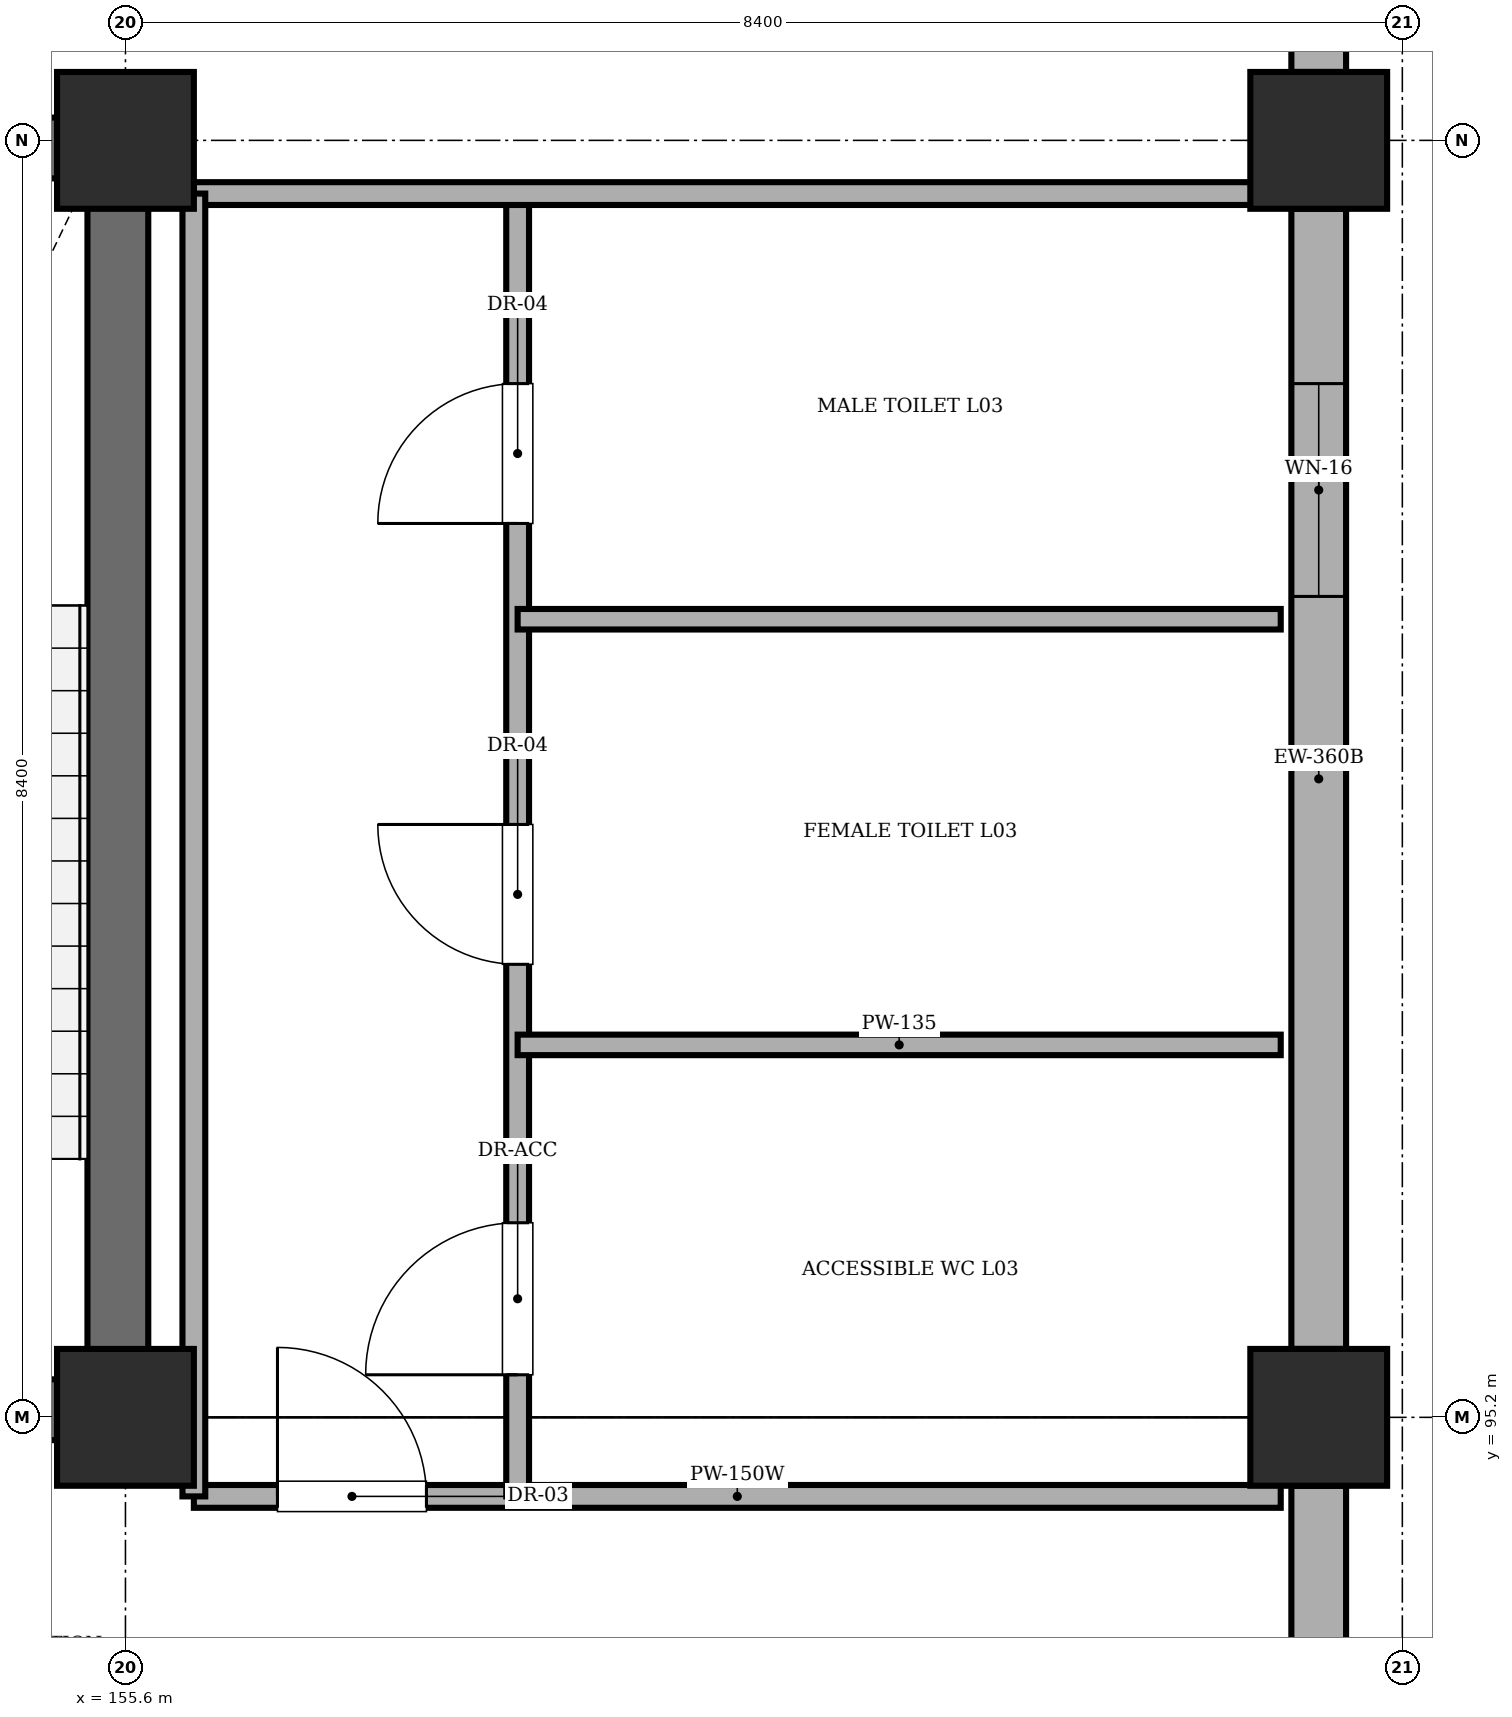
"""IFC4 building model, lengths in metres.
Left out: names, types, materials, properties, quantities, classifications, styles, units other than length and angle.
Written with IfcOpenShell. Run it as: python <this file> out.ifc"""

import sys

from ifc_helpers import new_model, si_unit, direction, frame, frame_2d, origin, origin_2d, place, context, subcontext, project, spatial, rectangle, extrude, element, fill, save


model = new_model("IFC4")
c1 = context("Model", 3, precision=1e-05, world=origin(), true_north=direction((0.0, 1.0)))
c2 = subcontext(c1, "Body", "Model", "MODEL_VIEW")
j1 = project(units=[si_unit("LENGTHUNIT", "METRE"), si_unit("PLANEANGLEUNIT", "RADIAN")], contexts=[c1])
p1 = place(None, origin())
s1 = spatial("IfcSite", under=j1, at=p1, CompositionType="ELEMENT")
p2 = place(p1, origin())
s2 = spatial("IfcBuilding", under=s1, at=p2, CompositionType="ELEMENT")
p3 = place(p2, frame((0.0, 0.0, 10.2)))
s3 = spatial("IfcBuildingStorey", under=s2, at=p3, CompositionType="ELEMENT", Elevation=10.2)
for number, where, z_axis, x_axis in (
    (1, (155.6, 95.2, 0.0), (0.0, 0.0, 1.0), (1.0, 0.0, 0.0)),
    (2, (155.6, 103.6, 0.0), (0.0, 0.0, 1.0), (1.0, 0.0, 0.0)),
    (3, (163.45, 95.2, 0.0), (0.0, 0.0, 1.0), (1.0, 0.0, 0.0)),
    (4, (163.45, 103.6, 0.0), (0.0, 0.0, 1.0), (1.0, 0.0, 0.0)),
):
    element("IfcColumn", number, at=place(p3, frame(where, z_axis=z_axis, x_axis=x_axis)), inside=s3, PredefinedType="COLUMN", context=c2, shape_type="SweptSolid", body=[
        extrude(rectangle(XDim=0.9, YDim=0.9, at=origin_2d()), origin(), (0.0, 0.0, 1.0), 4.26),
    ])
for number, where, z_axis, x_axis in (
    (5, (151.85, 95.25, 0.0), (0.0, 0.0, 1.0), (1.0, 0.0, 0.0)),
    (6, (151.85, 103.55, 0.0), (0.0, 0.0, 1.0), (1.0, 0.0, 0.0)),
):
    element("IfcWall", number, at=place(p3, frame(where, z_axis=z_axis, x_axis=x_axis)), inside=s3, PredefinedType="SHEAR", context=c2, shape_type="SweptSolid", body=[
        extrude(rectangle(XDim=3.9, YDim=0.4, at=frame_2d((1.95, 0.0))), origin(), (0.0, 0.0, 1.0), 4.26),
    ])
p4 = place(p3, frame((155.55, 95.45, 0.0), z_axis=(0.0, 0.0, 1.0), x_axis=(0.0, 1.0, 0.0)))
e7 = element("IfcWall", 7, at=p4, inside=s3, PredefinedType="SHEAR", context=c2, shape_type="SweptSolid", body=[
    extrude(rectangle(XDim=7.9, YDim=0.4, at=frame_2d((3.95, 0.0))), origin(), (0.0, 0.0, 1.0), 4.26),
])
p5 = place(p3, frame((163.45, 94.75, 0.0), z_axis=(0.0, 0.0, 1.0), x_axis=(0.0, -1.0, 0.0)))
e8 = element("IfcWall", 8, at=p5, inside=s3, PredefinedType="STANDARD", context=c2, shape_type="SweptSolid", body=[
    extrude(rectangle(XDim=7.5, YDim=0.36, at=frame_2d((3.75, 0.0))), origin(), (0.0, 0.0, 1.0), 3.51),
])
p6 = place(p5, frame((4.2, 0.0, 1.1)))
e9 = element("IfcOpeningElement", 9, at=p6, cuts=e8, PredefinedType="OPENING", context=c2, shape_type="SweptSolid", body=[
    extrude(rectangle(XDim=1.8, YDim=1.8, at=frame_2d((0.9, 0.9))), frame((0.0, 0.19, 0.0), z_axis=(0.0, -1.0, 0.0), x_axis=(1.0, 0.0, 0.0)), (0.0, 0.0, 1.0), 0.38),
])
p7 = place(p3, frame((163.45, 103.15, 0.0), z_axis=(0.0, 0.0, 1.0), x_axis=(0.0, -1.0, 0.0)))
e10 = element("IfcWall", 10, at=p7, inside=s3, PredefinedType="STANDARD", context=c2, shape_type="SweptSolid", body=[
    extrude(rectangle(XDim=7.5, YDim=0.36, at=frame_2d((3.75, 0.0))), origin(), (0.0, 0.0, 1.0), 3.51),
])
p8 = place(p7, frame((1.15, 0.0, 1.1)))
e11 = element("IfcOpeningElement", 11, at=p8, cuts=e10, PredefinedType="OPENING", context=c2, shape_type="SweptSolid", body=[
    extrude(rectangle(XDim=1.4, YDim=1.4, at=frame_2d((0.7, 0.7))), frame((0.0, 0.19, 0.0), z_axis=(0.0, -1.0, 0.0), x_axis=(1.0, 0.0, 0.0)), (0.0, 0.0, 1.0), 0.38),
])
p9 = place(p3, frame((163.45, 111.0, 0.0), z_axis=(0.0, 0.0, 1.0), x_axis=(0.0, -1.0, 0.0)))
e12 = element("IfcWall", 12, at=p9, inside=s3, PredefinedType="STANDARD", context=c2, shape_type="SweptSolid", body=[
    extrude(rectangle(XDim=6.95, YDim=0.36, at=frame_2d((3.475, 0.0))), origin(), (0.0, 0.0, 1.0), 3.51),
])
p10 = place(p9, frame((1.15, 0.0, 1.1)))
e13 = element("IfcOpeningElement", 13, at=p10, cuts=e12, PredefinedType="OPENING", context=c2, shape_type="SweptSolid", body=[
    extrude(rectangle(XDim=1.8, YDim=1.8, at=frame_2d((0.9, 0.9))), frame((0.0, 0.19, 0.0), z_axis=(0.0, -1.0, 0.0), x_axis=(1.0, 0.0, 0.0)), (0.0, 0.0, 1.0), 0.38),
])
p11 = place(p3, frame((156.05, 94.68, 0.0), z_axis=(0.0, 0.0, 1.0), x_axis=(1.0, 0.0, 0.0)))
e14 = element("IfcWall", 14, at=p11, inside=s3, PredefinedType="PARTITIONING", context=c2, shape_type="SweptSolid", body=[
    extrude(rectangle(XDim=7.15, YDim=0.15, at=frame_2d((3.575, 0.0))), origin(), (0.0, 0.0, 1.0), 4.26),
])
p12 = place(p11, frame((0.55, 0.0, 0.0)))
e15 = element("IfcOpeningElement", 15, at=p12, cuts=e14, PredefinedType="OPENING", context=c2, shape_type="SweptSolid", body=[
    extrude(rectangle(XDim=0.98, YDim=2.12, at=frame_2d((0.49, 1.06))), frame((0.0, 0.085, 0.0), z_axis=(0.0, -1.0, 0.0), x_axis=(1.0, 0.0, 0.0)), (0.0, 0.0, 1.0), 0.17),
])
p13 = place(p3, frame((158.18, 94.68, 0.0), z_axis=(0.0, 0.0, 1.0), x_axis=(0.0, 1.0, 0.0)))
e16 = element("IfcWall", 16, at=p13, inside=s3, PredefinedType="PARTITIONING", context=c2, shape_type="SweptSolid", body=[
    extrude(rectangle(XDim=8.57, YDim=0.15, at=frame_2d((4.285, 0.0))), origin(), (0.0, 0.0, 1.0), 4.26),
])
p14 = place(p13, frame((0.8, 0.0, 0.0)))
e17 = element("IfcOpeningElement", 17, at=p14, cuts=e16, PredefinedType="OPENING", context=c2, shape_type="SweptSolid", body=[
    extrude(rectangle(XDim=1.0, YDim=2.12, at=frame_2d((0.5, 1.06))), frame((0.0, 0.085, 0.0), z_axis=(0.0, -1.0, 0.0), x_axis=(1.0, 0.0, 0.0)), (0.0, 0.0, 1.0), 0.17),
])
p15 = place(p13, frame((3.5, 0.0, 0.0)))
e18 = element("IfcOpeningElement", 18, at=p15, cuts=e16, PredefinedType="OPENING", context=c2, shape_type="SweptSolid", body=[
    extrude(rectangle(XDim=0.92, YDim=2.1, at=frame_2d((0.46, 1.05))), frame((0.0, 0.085, 0.0), z_axis=(0.0, -1.0, 0.0), x_axis=(1.0, 0.0, 0.0)), (0.0, 0.0, 1.0), 0.17),
])
p16 = place(p13, frame((6.4, 0.0, 0.0)))
e19 = element("IfcOpeningElement", 19, at=p16, cuts=e16, PredefinedType="OPENING", context=c2, shape_type="SweptSolid", body=[
    extrude(rectangle(XDim=0.92, YDim=2.1, at=frame_2d((0.46, 1.05))), frame((0.0, 0.085, 0.0), z_axis=(0.0, -1.0, 0.0), x_axis=(1.0, 0.0, 0.0)), (0.0, 0.0, 1.0), 0.17),
])
for number, where, z_axis, x_axis in (
    (20, (158.18, 97.65, 0.0), (0.0, 0.0, 1.0), (1.0, 0.0, 0.0)),
    (21, (158.18, 100.45, 0.0), (0.0, 0.0, 1.0), (1.0, 0.0, 0.0)),
):
    element("IfcWall", number, at=place(p3, frame(where, z_axis=z_axis, x_axis=x_axis)), inside=s3, PredefinedType="PARTITIONING", context=c2, shape_type="SweptSolid", body=[
        extrude(rectangle(XDim=5.02, YDim=0.135, at=frame_2d((2.51, 0.0))), origin(), (0.0, 0.0, 1.0), 4.26),
    ])
p17 = place(p3, frame((156.05, 103.25, 0.0), z_axis=(0.0, 0.0, 1.0), x_axis=(1.0, 0.0, 0.0)))
e22 = element("IfcWall", 22, at=p17, inside=s3, PredefinedType="PARTITIONING", context=c2, shape_type="SweptSolid", body=[
    extrude(rectangle(XDim=7.15, YDim=0.15, at=frame_2d((3.575, 0.0))), origin(), (0.0, 0.0, 1.0), 4.26),
])
p18 = place(p3, frame((156.05, 94.68, 0.0), z_axis=(0.0, 0.0, 1.0), x_axis=(0.0, 1.0, 0.0)))
e23 = element("IfcWall", 23, at=p18, inside=s3, PredefinedType="PARTITIONING", context=c2, shape_type="SweptSolid", body=[
    extrude(rectangle(XDim=8.57, YDim=0.15, at=frame_2d((4.285, 0.0))), origin(), (0.0, 0.0, 1.0), 4.26),
])
p19 = place(p8, origin())
e24 = element("IfcWindow", 24, at=p19, inside=s3, PartitioningType="SINGLE_PANEL", PredefinedType="WINDOW", context=c2, shape_type="SweptSolid", body=[
    extrude(rectangle(XDim=1.4, YDim=1.4, at=frame_2d((0.7, 0.7))), frame((0.0, 0.03, 0.0), z_axis=(0.0, -1.0, 0.0), x_axis=(1.0, 0.0, 0.0)), (0.0, 0.0, 1.0), 0.06),
])
fill(e11, e24)
p20 = place(p12, origin())
e25 = element("IfcDoor", 25, at=p20, inside=s3, OperationType="SINGLE_SWING_LEFT", PredefinedType="DOOR", context=c2, shape_type="SweptSolid", body=[
    extrude(rectangle(XDim=0.98, YDim=2.12, at=frame_2d((0.49, 1.06))), frame((0.0, 0.025, 0.0), z_axis=(0.0, -1.0, 0.0), x_axis=(1.0, 0.0, 0.0)), (0.0, 0.0, 1.0), 0.05),
])
fill(e15, e25)
p21 = place(p14, origin())
e26 = element("IfcDoor", 26, at=p21, inside=s3, OperationType="SINGLE_SWING_LEFT", PredefinedType="DOOR", context=c2, shape_type="SweptSolid", body=[
    extrude(rectangle(XDim=1.0, YDim=2.12, at=frame_2d((0.5, 1.06))), frame((0.0, 0.025, 0.0), z_axis=(0.0, -1.0, 0.0), x_axis=(1.0, 0.0, 0.0)), (0.0, 0.0, 1.0), 0.05),
])
fill(e17, e26)
p22 = place(p15, origin())
e27 = element("IfcDoor", 27, at=p22, inside=s3, OperationType="SINGLE_SWING_RIGHT", PredefinedType="DOOR", context=c2, shape_type="SweptSolid", body=[
    extrude(rectangle(XDim=0.92, YDim=2.1, at=frame_2d((0.46, 1.05))), frame((0.0, 0.025, 0.0), z_axis=(0.0, -1.0, 0.0), x_axis=(1.0, 0.0, 0.0)), (0.0, 0.0, 1.0), 0.05),
])
fill(e18, e27)
p23 = place(p16, origin())
e28 = element("IfcDoor", 28, at=p23, inside=s3, OperationType="SINGLE_SWING_LEFT", PredefinedType="DOOR", context=c2, shape_type="SweptSolid", body=[
    extrude(rectangle(XDim=0.92, YDim=2.1, at=frame_2d((0.46, 1.05))), frame((0.0, 0.025, 0.0), z_axis=(0.0, -1.0, 0.0), x_axis=(1.0, 0.0, 0.0)), (0.0, 0.0, 1.0), 0.05),
])
fill(e19, e28)
save(model, sys.argv[1])
